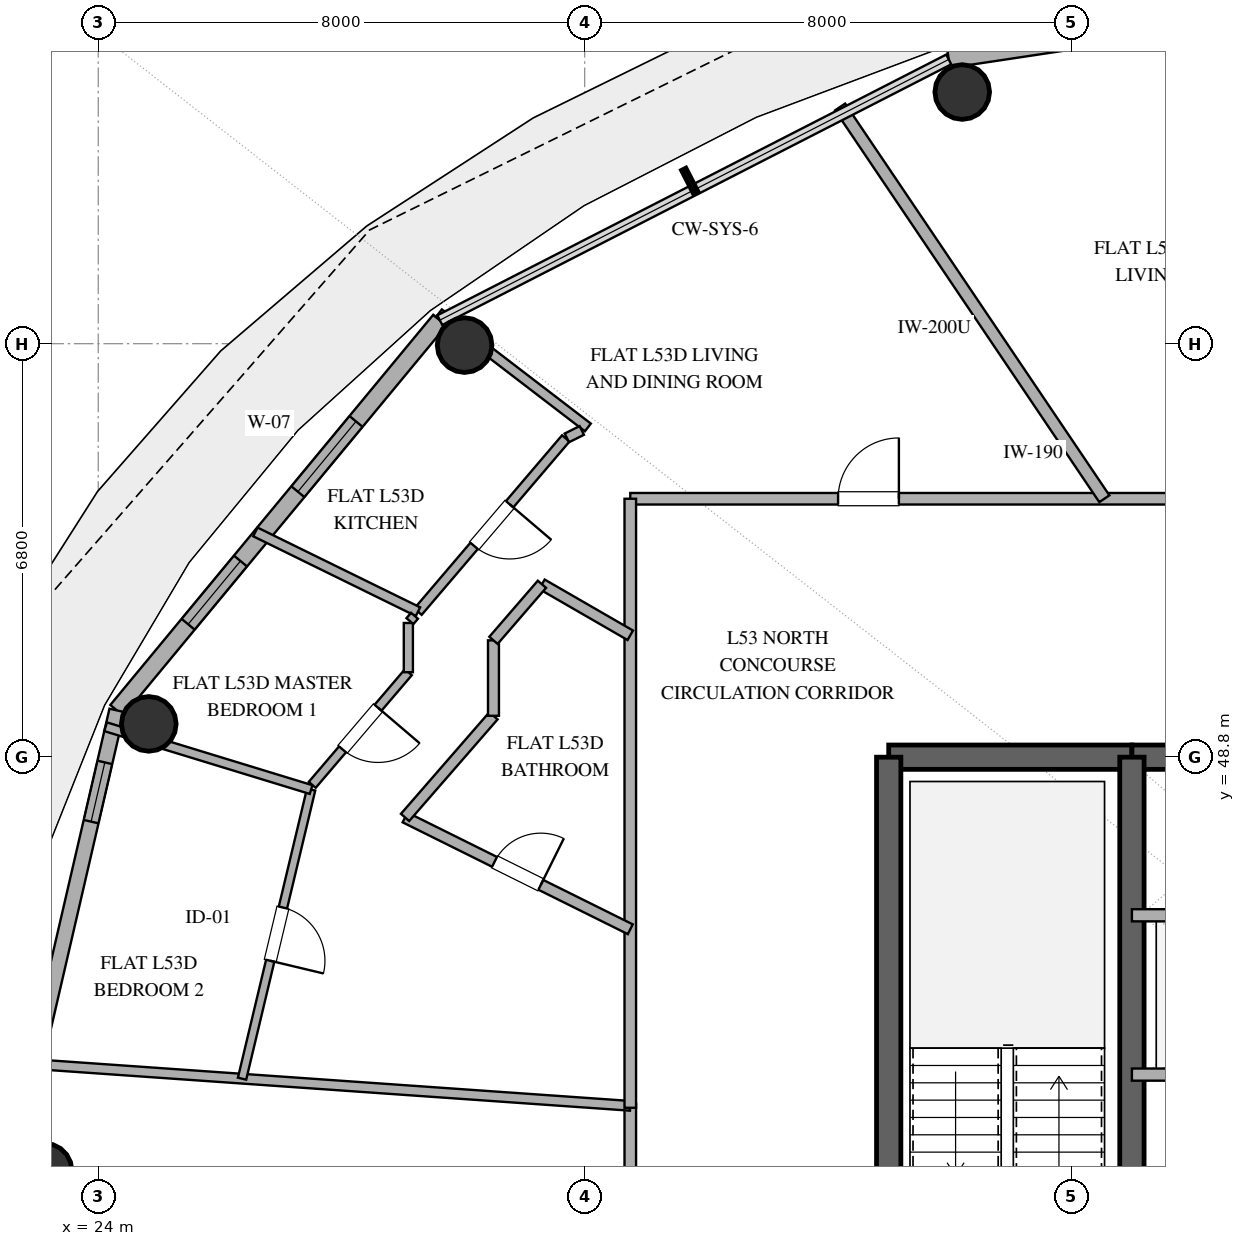
"""IFC4 building model, lengths in metres.
Left out: names, types, materials, properties, quantities, classifications, styles, units other than length and angle.
Written with IfcOpenShell. Run it as: python <this file> out.ifc"""

import sys

from ifc_helpers import new_model, si_unit, direction, frame, frame_2d, origin, origin_2d, place, context, subcontext, project, spatial, rectangle, hollow_circle, extrude, element, fill, save


model = new_model("IFC4")
c1 = context("Model", 3, precision=1e-05, world=origin(), true_north=direction((0.0, 1.0)))
c2 = subcontext(c1, "Body", "Model", "MODEL_VIEW")
j1 = project(units=[si_unit("LENGTHUNIT", "METRE"), si_unit("PLANEANGLEUNIT", "RADIAN")], contexts=[c1])
p1 = place(None, origin())
s1 = spatial("IfcSite", under=j1, at=p1, CompositionType="ELEMENT")
p2 = place(p1, origin())
s2 = spatial("IfcBuilding", under=s1, at=p2, CompositionType="ELEMENT")
p3 = place(p2, frame((0.0, 0.0, 210.0)))
s3 = spatial("IfcBuildingStorey", under=s2, at=p3, CompositionType="ELEMENT", Elevation=210.0)
p4 = place(p3, frame((37.0, 48.8, 0.0), z_axis=(0.0, 0.0, 1.0), x_axis=(1.0, 0.0, 0.0)))
e1 = element("IfcWall", 1, at=p4, inside=s3, PredefinedType="SHEAR", context=c2, shape_type="SweptSolid", body=[
    extrude(rectangle(XDim=4.0, YDim=0.4, at=frame_2d((2.0, 0.0))), origin(), (0.0, 0.0, 1.0), 3.36),
])
p5 = place(p3, frame((41.0, 48.8, 0.0), z_axis=(0.0, 0.0, 1.0), x_axis=(1.0, 0.0, 0.0)))
e2 = element("IfcWall", 2, at=p5, inside=s3, PredefinedType="SHEAR", context=c2, shape_type="SweptSolid", body=[
    extrude(rectangle(XDim=14.0, YDim=0.4, at=frame_2d((7.0, 0.0))), origin(), (0.0, 0.0, 1.0), 3.36),
])
p6 = place(p5, frame((6.1, 0.0, 0.0)))
e3 = element("IfcOpeningElement", 3, at=p6, cuts=e2, PredefinedType="OPENING", context=c2, shape_type="SweptSolid", body=[
    extrude(rectangle(XDim=1.8, YDim=2.25, at=frame_2d((0.9, 1.125))), frame((0.0, 0.21, 0.0), z_axis=(0.0, -1.0, 0.0), x_axis=(1.0, 0.0, 0.0)), (0.0, 0.0, 1.0), 0.42),
])
p7 = place(p3, frame((37.0, 35.2, 0.0), z_axis=(0.0, 0.0, 1.0), x_axis=(0.0, 1.0, 0.0)))
e4 = element("IfcWall", 4, at=p7, inside=s3, PredefinedType="SHEAR", context=c2, shape_type="SweptSolid", body=[
    extrude(rectangle(XDim=13.6, YDim=0.4, at=frame_2d((6.8, 0.0))), origin(), (0.0, 0.0, 1.0), 3.36),
])
p8 = place(p3, frame((41.0, 35.2, 0.0), z_axis=(0.0, 0.0, 1.0), x_axis=(0.0, 1.0, 0.0)))
e5 = element("IfcWall", 5, at=p8, inside=s3, PredefinedType="SHEAR", context=c2, shape_type="SweptSolid", body=[
    extrude(rectangle(XDim=13.6, YDim=0.4, at=frame_2d((6.8, 0.0))), origin(), (0.0, 0.0, 1.0), 3.36),
])
p9 = place(p8, frame((1.15, 0.0, 0.0)))
e6 = element("IfcOpeningElement", 6, at=p9, cuts=e5, PredefinedType="OPENING", context=c2, shape_type="SweptSolid", body=[
    extrude(rectangle(XDim=1.1, YDim=2.2, at=frame_2d((0.55, 1.1))), frame((0.0, 0.21, 0.0), z_axis=(0.0, -1.0, 0.0), x_axis=(1.0, 0.0, 0.0)), (0.0, 0.0, 1.0), 0.42),
])
for number, where, z_axis, x_axis in (
    (7, (38.209, 59.739, 0.0), (0.0, 0.0, 1.0), (1.0, 0.0, 0.0)),
    (8, (30.025, 55.576, 0.0), (0.0, 0.0, 1.0), (1.0, 0.0, 0.0)),
    (9, (24.831, 49.347, 0.0), (0.0, 0.0, 1.0), (1.0, 0.0, 0.0)),
    (10, (23.117, 42.0, 0.0), (0.0, 0.0, 1.0), (1.0, 0.0, 0.0)),
):
    element("IfcColumn", number, at=place(p3, frame(where, z_axis=z_axis, x_axis=x_axis)), inside=s3, PredefinedType="COLUMN", context=c2, shape_type="SweptSolid", body=[
        extrude(hollow_circle(Radius=0.45, WallThickness=0.025, at=origin_2d()), origin(), (0.0, 0.0, 1.0), 3.36),
    ])
p10 = place(p3, frame((48.0, 61.78, 0.0), z_axis=(0.0, 0.0, 1.0), x_axis=(-0.988882522213, -0.148698881169, 0.0)))
e11 = element("IfcWall", 11, at=p10, inside=s3, PredefinedType="SOLIDWALL", context=c2, shape_type="SweptSolid", body=[
    extrude(rectangle(XDim=10.125, YDim=0.28, at=frame_2d((5.062, 0.0))), origin(), (0.0, 0.0, 1.0), 3.36),
])
p11 = place(p10, frame((1.516, 0.0, 0.0)))
e12 = element("IfcOpeningElement", 12, at=p11, cuts=e11, PredefinedType="OPENING", context=c2, shape_type="SweptSolid", body=[
    extrude(rectangle(XDim=1.1, YDim=2.25, at=frame_2d((0.55, 1.125))), frame((0.0, 0.15, 0.0), z_axis=(0.0, -1.0, 0.0), x_axis=(1.0, 0.0, 0.0)), (0.0, 0.0, 1.0), 0.3),
])
p12 = place(p10, frame((4.422, 0.0, 0.85)))
e13 = element("IfcOpeningElement", 13, at=p12, cuts=e11, PredefinedType="OPENING", context=c2, shape_type="SweptSolid", body=[
    extrude(rectangle(XDim=1.5, YDim=2.0, at=frame_2d((0.75, 1.0))), frame((0.0, 0.15, 0.0), z_axis=(0.0, -1.0, 0.0), x_axis=(1.0, 0.0, 0.0)), (0.0, 0.0, 1.0), 0.3),
])
p13 = place(p10, frame((6.504, 0.0, 0.85)))
e14 = element("IfcOpeningElement", 14, at=p13, cuts=e11, PredefinedType="OPENING", context=c2, shape_type="SweptSolid", body=[
    extrude(rectangle(XDim=1.5, YDim=2.0, at=frame_2d((0.75, 1.0))), frame((0.0, 0.15, 0.0), z_axis=(0.0, -1.0, 0.0), x_axis=(1.0, 0.0, 0.0)), (0.0, 0.0, 1.0), 0.3),
])
p14 = place(p3, frame((29.617, 55.987, 0.0), z_axis=(0.0, 0.0, 1.0), x_axis=(-0.63761509934, -0.770355103243, 0.0)))
e15 = element("IfcWall", 15, at=p14, inside=s3, PredefinedType="SOLIDWALL", context=c2, shape_type="SweptSolid", body=[
    extrude(rectangle(XDim=8.33, YDim=0.28, at=frame_2d((4.165, 0.0))), origin(), (0.0, 0.0, 1.0), 3.36),
])
p15 = place(p14, frame((2.162, 0.0, 0.85)))
e16 = element("IfcOpeningElement", 16, at=p15, cuts=e15, PredefinedType="OPENING", context=c2, shape_type="SweptSolid", body=[
    extrude(rectangle(XDim=1.5, YDim=1.8, at=frame_2d((0.75, 0.9))), frame((0.0, 0.15, 0.0), z_axis=(0.0, -1.0, 0.0), x_axis=(1.0, 0.0, 0.0)), (0.0, 0.0, 1.0), 0.3),
])
p16 = place(p14, frame((5.142, 0.0, 0.85)))
e17 = element("IfcOpeningElement", 17, at=p16, cuts=e15, PredefinedType="OPENING", context=c2, shape_type="SweptSolid", body=[
    extrude(rectangle(XDim=1.35, YDim=1.8, at=frame_2d((0.675, 0.9))), frame((0.0, 0.15, 0.0), z_axis=(0.0, -1.0, 0.0), x_axis=(1.0, 0.0, 0.0)), (0.0, 0.0, 1.0), 0.3),
])
p17 = place(p3, frame((24.306, 49.57, 0.0), z_axis=(0.0, 0.0, 1.0), x_axis=(-0.225635078214, -0.974211892495, 0.0)))
e18 = element("IfcWall", 18, at=p17, inside=s3, PredefinedType="SOLIDWALL", context=c2, shape_type="SweptSolid", body=[
    extrude(rectangle(XDim=7.77, YDim=0.25, at=frame_2d((3.885, 0.0))), origin(), (0.0, 0.0, 1.0), 3.36),
])
p18 = place(p17, frame((0.878, 0.0, 0.35)))
e19 = element("IfcOpeningElement", 19, at=p18, cuts=e18, PredefinedType="OPENING", context=c2, shape_type="SweptSolid", body=[
    extrude(rectangle(XDim=1.0, YDim=1.05, at=frame_2d((0.5, 0.525))), frame((0.0, 0.135, 0.0), z_axis=(0.0, -1.0, 0.0), x_axis=(1.0, 0.0, 0.0)), (0.0, 0.0, 1.0), 0.27),
])
for number, where, z_axis, x_axis in (
    (20, (41.0, 46.2, 0.0), (0.0, 0.0, 1.0), (1.0, 0.0, 0.0)),
    (21, (41.0, 43.58, 0.0), (0.0, 0.0, 1.0), (1.0, 0.0, 0.0)),
):
    element("IfcWall", number, at=place(p3, frame(where, z_axis=z_axis, x_axis=x_axis)), inside=s3, PredefinedType="SOLIDWALL", context=c2, shape_type="SweptSolid", body=[
        extrude(rectangle(XDim=2.95, YDim=0.2, at=frame_2d((1.475, 0.0))), origin(), (0.0, 0.0, 1.0), 2.72),
    ])
p19 = place(p3, frame((32.75, 53.05, 0.0), z_axis=(0.0, 0.0, 1.0), x_axis=(1.0, 0.0, 0.0)))
e22 = element("IfcWall", 22, at=p19, inside=s3, PredefinedType="PARTITIONING", context=c2, shape_type="SweptSolid", body=[
    extrude(rectangle(XDim=13.247, YDim=0.19, at=frame_2d((6.623, 0.0))), origin(), (0.0, 0.0, 1.0), 2.72),
])
p20 = place(p19, frame((3.417, 0.0, 0.0)))
e23 = element("IfcOpeningElement", 23, at=p20, cuts=e22, PredefinedType="OPENING", context=c2, shape_type="SweptSolid", body=[
    extrude(rectangle(XDim=1.0, YDim=2.2, at=frame_2d((0.5, 1.1))), frame((0.0, 0.105, 0.0), z_axis=(0.0, -1.0, 0.0), x_axis=(1.0, 0.0, 0.0)), (0.0, 0.0, 1.0), 0.21),
])
p21 = place(p19, frame((10.002, 0.0, 0.0)))
e24 = element("IfcOpeningElement", 24, at=p21, cuts=e22, PredefinedType="OPENING", context=c2, shape_type="SweptSolid", body=[
    extrude(rectangle(XDim=1.0, YDim=2.2, at=frame_2d((0.5, 1.1))), frame((0.0, 0.105, 0.0), z_axis=(0.0, -1.0, 0.0), x_axis=(1.0, 0.0, 0.0)), (0.0, 0.0, 1.0), 0.21),
])
p22 = place(p3, frame((40.547, 53.05, 0.0), z_axis=(0.0, 0.0, 1.0), x_axis=(-0.559208454265, 0.8290270832, 0.0)))
e25 = element("IfcWall", 25, at=p22, inside=s3, PredefinedType="PARTITIONING", context=c2, shape_type="SweptSolid", body=[
    extrude(rectangle(XDim=7.771, YDim=0.2, at=frame_2d((3.886, 0.0))), origin(), (0.0, 0.0, 1.0), 2.72),
])
p23 = place(p3, frame((32.75, 30.95, 0.0), z_axis=(0.0, 0.0, 1.0), x_axis=(0.0, 1.0, 0.0)))
e26 = element("IfcWall", 26, at=p23, inside=s3, PredefinedType="PARTITIONING", context=c2, shape_type="SweptSolid", body=[
    extrude(rectangle(XDim=12.148, YDim=0.19, at=frame_2d((6.074, 0.0))), origin(), (0.0, 0.0, 1.0), 2.72),
])
p24 = place(p23, frame((3.214, 0.0, 0.0)))
e27 = element("IfcOpeningElement", 27, at=p24, cuts=e26, PredefinedType="OPENING", context=c2, shape_type="SweptSolid", body=[
    extrude(rectangle(XDim=1.0, YDim=2.2, at=frame_2d((0.5, 1.1))), frame((0.0, 0.105, 0.0), z_axis=(0.0, -1.0, 0.0), x_axis=(1.0, 0.0, 0.0)), (0.0, 0.0, 1.0), 0.21),
])
p25 = place(p3, frame((22.839, 43.76, 0.0), z_axis=(0.0, 0.0, 1.0), x_axis=(0.997563620801, -0.069762615023, 0.0)))
e28 = element("IfcWall", 28, at=p25, inside=s3, PredefinedType="PLUMBINGWALL", context=c2, shape_type="SweptSolid", body=[
    extrude(rectangle(XDim=9.935, YDim=0.16, at=frame_2d((4.968, 0.0))), origin(), (0.0, 0.0, 1.0), 2.72),
])
p26 = place(p3, frame((32.75, 43.034, 0.0), z_axis=(0.0, 0.0, 1.0), x_axis=(0.0, 1.0, 0.0)))
e29 = element("IfcWall", 29, at=p26, inside=s3, PredefinedType="PARTITIONING", context=c2, shape_type="SweptSolid", body=[
    extrude(rectangle(XDim=10.016, YDim=0.19, at=frame_2d((5.008, 0.0))), origin(), (0.0, 0.0, 1.0), 2.72),
])
p27 = place(p3, frame((27.5, 48.267, 0.0), z_axis=(0.0, 0.0, 1.0), x_axis=(-0.232297954947, -0.972644673109, 0.0)))
e30 = element("IfcWall", 30, at=p27, inside=s3, PredefinedType="PARTITIONING", context=c2, shape_type="SweptSolid", body=[
    extrude(rectangle(XDim=4.888, YDim=0.14, at=frame_2d((2.444, 0.0))), origin(), (0.0, 0.0, 1.0), 2.72),
])
p28 = place(p27, frame((1.994, 0.0, 0.0)))
e31 = element("IfcOpeningElement", 31, at=p28, cuts=e30, PredefinedType="OPENING", context=c2, shape_type="SweptSolid", body=[
    extrude(rectangle(XDim=0.9, YDim=2.1, at=frame_2d((0.45, 1.05))), frame((0.0, 0.08, 0.0), z_axis=(0.0, -1.0, 0.0), x_axis=(1.0, 0.0, 0.0)), (0.0, 0.0, 1.0), 0.16),
])
p29 = place(p3, frame((29.046, 47.809, 0.0), z_axis=(0.0, 0.0, 1.0), x_axis=(0.895675225239, -0.444708770876, 0.0)))
e32 = element("IfcWall", 32, at=p29, inside=s3, PredefinedType="PLUMBINGWALL", context=c2, shape_type="SweptSolid", body=[
    extrude(rectangle(XDim=4.135, YDim=0.18, at=frame_2d((2.068, 0.0))), origin(), (0.0, 0.0, 1.0), 2.72),
])
p30 = place(p29, frame((1.643, 0.0, 0.0)))
e33 = element("IfcOpeningElement", 33, at=p30, cuts=e32, PredefinedType="OPENING", context=c2, shape_type="SweptSolid", body=[
    extrude(rectangle(XDim=0.85, YDim=2.1, at=frame_2d((0.425, 1.05))), frame((0.0, 0.1, 0.0), z_axis=(0.0, -1.0, 0.0), x_axis=(1.0, 0.0, 0.0)), (0.0, 0.0, 1.0), 0.2),
])
p31 = place(p3, frame((31.689, 54.042, 0.0), z_axis=(0.0, 0.0, 1.0), x_axis=(-0.648996547252, -0.760791352248, 0.0)))
e34 = element("IfcWall", 34, at=p31, inside=s3, PredefinedType="PLUMBINGWALL", context=c2, shape_type="SweptSolid", body=[
    extrude(rectangle(XDim=3.745, YDim=0.16, at=frame_2d((1.873, 0.0))), origin(), (0.0, 0.0, 1.0), 2.72),
])
p32 = place(p31, frame((1.423, 0.0, 0.0)))
e35 = element("IfcOpeningElement", 35, at=p32, cuts=e34, PredefinedType="OPENING", context=c2, shape_type="SweptSolid", body=[
    extrude(rectangle(XDim=0.9, YDim=2.1, at=frame_2d((0.45, 1.05))), frame((0.0, 0.09, 0.0), z_axis=(0.0, -1.0, 0.0), x_axis=(1.0, 0.0, 0.0)), (0.0, 0.0, 1.0), 0.18),
])
p33 = place(p3, frame((27.5, 48.267, 0.0), z_axis=(0.0, 0.0, 1.0), x_axis=(-0.956303289689, 0.292376500647, 0.0)))
e36 = element("IfcWall", 36, at=p33, inside=s3, PredefinedType="PARTITIONING", context=c2, shape_type="SweptSolid", body=[
    extrude(rectangle(XDim=3.534, YDim=0.15, at=frame_2d((1.767, 0.0))), origin(), (0.0, 0.0, 1.0), 2.72),
])
p34 = place(p3, frame((29.603, 56.101, 0.0), z_axis=(0.0, 0.0, 1.0), x_axis=(0.793701828105, -0.608307001491, 0.0)))
e37 = element("IfcWall", 37, at=p34, inside=s3, PredefinedType="PLUMBINGWALL", context=c2, shape_type="SweptSolid", body=[
    extrude(rectangle(XDim=3.087, YDim=0.16, at=frame_2d((1.543, 0.0))), origin(), (0.0, 0.0, 1.0), 2.72),
])
p35 = place(p3, frame((29.258, 51.193, 0.0), z_axis=(0.0, 0.0, 1.0), x_axis=(-0.897810810902, 0.440381366348, 0.0)))
e38 = element("IfcWall", 38, at=p35, inside=s3, PredefinedType="PLUMBINGWALL", context=c2, shape_type="SweptSolid", body=[
    extrude(rectangle(XDim=2.979, YDim=0.16, at=frame_2d((1.489, 0.0))), origin(), (0.0, 0.0, 1.0), 2.72),
])
p36 = place(p3, frame((29.1, 50.197, 0.0), z_axis=(0.0, 0.0, 1.0), x_axis=(-0.649270866973, -0.760557257082, 0.0)))
e39 = element("IfcWall", 39, at=p36, inside=s3, PredefinedType="PARTITIONING", context=c2, shape_type="SweptSolid", body=[
    extrude(rectangle(XDim=2.435, YDim=0.15, at=frame_2d((1.218, 0.0))), origin(), (0.0, 0.0, 1.0), 2.72),
])
p37 = place(p36, frame((0.768, 0.0, 0.0)))
e40 = element("IfcOpeningElement", 40, at=p37, cuts=e39, PredefinedType="OPENING", context=c2, shape_type="SweptSolid", body=[
    extrude(rectangle(XDim=0.9, YDim=2.1, at=frame_2d((0.45, 1.05))), frame((0.0, 0.085, 0.0), z_axis=(0.0, -1.0, 0.0), x_axis=(1.0, 0.0, 0.0)), (0.0, 0.0, 1.0), 0.17),
])
p38 = place(p3, frame((30.5, 49.481, 0.0), z_axis=(0.0, 0.0, 1.0), x_axis=(-0.656364223854, -0.754444169998, 0.0)))
e41 = element("IfcWall", 41, at=p38, inside=s3, PredefinedType="PLUMBINGWALL", context=c2, shape_type="SweptSolid", body=[
    extrude(rectangle(XDim=2.215, YDim=0.18, at=frame_2d((1.108, 0.0))), origin(), (0.0, 0.0, 1.0), 2.72),
])
p39 = place(p3, frame((32.75, 50.805, 0.0), z_axis=(0.0, 0.0, 1.0), x_axis=(-0.866013522419, 0.500020578564, 0.0)))
e42 = element("IfcWall", 42, at=p39, inside=s3, PredefinedType="PLUMBINGWALL", context=c2, shape_type="SweptSolid", body=[
    extrude(rectangle(XDim=1.678, YDim=0.18, at=frame_2d((0.839, 0.0))), origin(), (0.0, 0.0, 1.0), 2.72),
])
p40 = place(p3, frame((30.5, 50.721, 0.0), z_axis=(0.0, 0.0, 1.0), x_axis=(0.0, -1.0, 0.0)))
e43 = element("IfcWall", 43, at=p40, inside=s3, PredefinedType="PLUMBINGWALL", context=c2, shape_type="SweptSolid", body=[
    extrude(rectangle(XDim=1.24, YDim=0.18, at=frame_2d((0.62, 0.0))), origin(), (0.0, 0.0, 1.0), 2.72),
])
p41 = place(p3, frame((31.297, 51.644, 0.0), z_axis=(0.0, 0.0, 1.0), x_axis=(-0.653870108477, -0.756606820773, 0.0)))
e44 = element("IfcWall", 44, at=p41, inside=s3, PredefinedType="PLUMBINGWALL", context=c2, shape_type="SweptSolid", body=[
    extrude(rectangle(XDim=1.219, YDim=0.18, at=frame_2d((0.609, 0.0))), origin(), (0.0, 0.0, 1.0), 2.72),
])
p42 = place(p3, frame((29.1, 51.007, 0.0), z_axis=(0.0, 0.0, 1.0), x_axis=(0.0, -1.0, 0.0)))
e45 = element("IfcWall", 45, at=p42, inside=s3, PredefinedType="PARTITIONING", context=c2, shape_type="SweptSolid", body=[
    extrude(rectangle(XDim=0.81, YDim=0.15, at=frame_2d((0.405, 0.0))), origin(), (0.0, 0.0, 1.0), 2.72),
])
p43 = place(p3, frame((31.952, 54.173, 0.0), z_axis=(0.0, 0.0, 1.0), x_axis=(-0.895316278345, -0.445430984251, 0.0)))
e46 = element("IfcWall", 46, at=p43, inside=s3, PredefinedType="PLUMBINGWALL", context=c2, shape_type="SweptSolid", body=[
    extrude(rectangle(XDim=0.274, YDim=0.16, at=frame_2d((0.137, 0.0))), origin(), (0.0, 0.0, 1.0), 2.72),
])
p44 = place(p3, frame((29.201, 51.126, 0.0), z_axis=(0.0, 0.0, 1.0), x_axis=(-0.649232735888, -0.760589807092, 0.0)))
e47 = element("IfcWall", 47, at=p44, inside=s3, PredefinedType="PARTITIONING", context=c2, shape_type="SweptSolid", body=[
    extrude(rectangle(XDim=0.116, YDim=0.15, at=frame_2d((0.058, 0.0))), origin(), (0.0, 0.0, 1.0), 2.72),
])
p45 = place(p15, origin())
e48 = element("IfcWindow", 48, at=p45, inside=s3, PartitioningType="SINGLE_PANEL", PredefinedType="WINDOW", context=c2, shape_type="SweptSolid", body=[
    extrude(rectangle(XDim=1.5, YDim=1.8, at=frame_2d((0.75, 0.9))), frame((0.0, 0.03, 0.0), z_axis=(0.0, -1.0, 0.0), x_axis=(1.0, 0.0, 0.0)), (0.0, 0.0, 1.0), 0.06),
])
fill(e16, e48)
p46 = place(p16, origin())
e49 = element("IfcWindow", 49, at=p46, inside=s3, PartitioningType="SINGLE_PANEL", PredefinedType="WINDOW", context=c2, shape_type="SweptSolid", body=[
    extrude(rectangle(XDim=1.35, YDim=1.8, at=frame_2d((0.675, 0.9))), frame((0.0, 0.03, 0.0), z_axis=(0.0, -1.0, 0.0), x_axis=(1.0, 0.0, 0.0)), (0.0, 0.0, 1.0), 0.06),
])
fill(e17, e49)
p47 = place(p18, origin())
e50 = element("IfcWindow", 50, at=p47, inside=s3, PartitioningType="SINGLE_PANEL", PredefinedType="WINDOW", context=c2, shape_type="SweptSolid", body=[
    extrude(rectangle(XDim=1.0, YDim=1.05, at=frame_2d((0.5, 0.525))), frame((0.0, 0.03, 0.0), z_axis=(0.0, -1.0, 0.0), x_axis=(1.0, 0.0, 0.0)), (0.0, 0.0, 1.0), 0.06),
])
fill(e19, e50)
p48 = place(p20, origin())
e51 = element("IfcDoor", 51, at=p48, inside=s3, OperationType="SINGLE_SWING_RIGHT", PredefinedType="DOOR", context=c2, shape_type="SweptSolid", body=[
    extrude(rectangle(XDim=1.0, YDim=2.2, at=frame_2d((0.5, 1.1))), frame((0.0, 0.025, 0.0), z_axis=(0.0, -1.0, 0.0), x_axis=(1.0, 0.0, 0.0)), (0.0, 0.0, 1.0), 0.05),
])
fill(e23, e51)
p49 = place(p28, origin())
e52 = element("IfcDoor", 52, at=p49, inside=s3, OperationType="SINGLE_SWING_RIGHT", PredefinedType="DOOR", context=c2, shape_type="SweptSolid", body=[
    extrude(rectangle(XDim=0.9, YDim=2.1, at=frame_2d((0.45, 1.05))), frame((0.0, 0.025, 0.0), z_axis=(0.0, -1.0, 0.0), x_axis=(1.0, 0.0, 0.0)), (0.0, 0.0, 1.0), 0.05),
])
fill(e31, e52)
p50 = place(p30, origin())
e53 = element("IfcDoor", 53, at=p50, inside=s3, OperationType="SINGLE_SWING_RIGHT", PredefinedType="DOOR", context=c2, shape_type="SweptSolid", body=[
    extrude(rectangle(XDim=0.85, YDim=2.1, at=frame_2d((0.425, 1.05))), frame((0.0, 0.025, 0.0), z_axis=(0.0, -1.0, 0.0), x_axis=(1.0, 0.0, 0.0)), (0.0, 0.0, 1.0), 0.05),
])
fill(e33, e53)
p51 = place(p32, origin())
e54 = element("IfcDoor", 54, at=p51, inside=s3, OperationType="SINGLE_SWING_LEFT", PredefinedType="DOOR", context=c2, shape_type="SweptSolid", body=[
    extrude(rectangle(XDim=0.9, YDim=2.1, at=frame_2d((0.45, 1.05))), frame((0.0, 0.025, 0.0), z_axis=(0.0, -1.0, 0.0), x_axis=(1.0, 0.0, 0.0)), (0.0, 0.0, 1.0), 0.05),
])
fill(e35, e54)
p52 = place(p37, origin())
e55 = element("IfcDoor", 55, at=p52, inside=s3, OperationType="SINGLE_SWING_LEFT", PredefinedType="DOOR", context=c2, shape_type="SweptSolid", body=[
    extrude(rectangle(XDim=0.9, YDim=2.1, at=frame_2d((0.45, 1.05))), frame((0.0, 0.025, 0.0), z_axis=(0.0, -1.0, 0.0), x_axis=(1.0, 0.0, 0.0)), (0.0, 0.0, 1.0), 0.05),
])
fill(e40, e55)
save(model, sys.argv[1])
